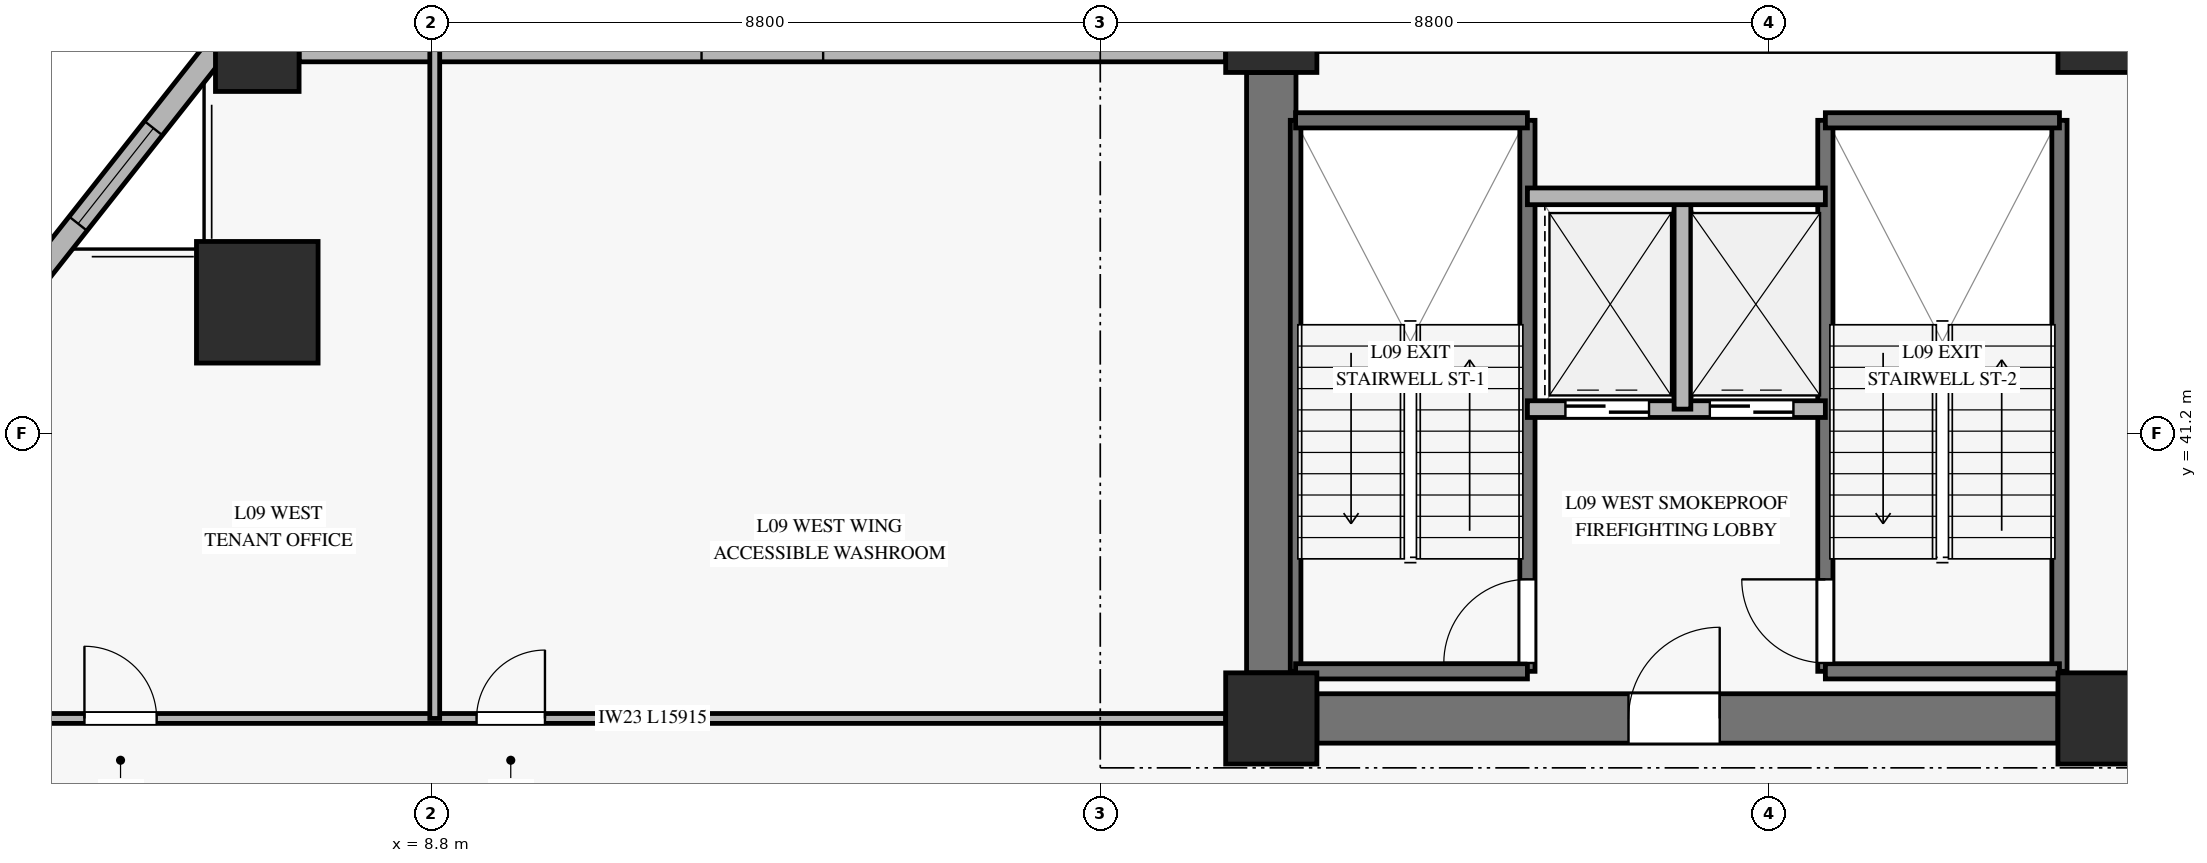
"""IFC4 building model, lengths in metres.
Left out: names, types, materials, properties, quantities, classifications, styles, units other than length and angle.
Written with IfcOpenShell. Run it as: python <this file> out.ifc"""

import sys

from ifc_helpers import new_model, si_unit, direction, frame, frame_2d, origin, origin_2d, place, context, subcontext, project, spatial, rectangle, hollow_rectangle, extrude, source, transform, mapped, element, fill, save


model = new_model("IFC4")
c1 = context("Model", 3, precision=1e-05, world=origin(), true_north=direction((0.0, 1.0)))
c2 = subcontext(c1, "Body", "Model", "MODEL_VIEW")
j1 = project(units=[si_unit("LENGTHUNIT", "METRE"), si_unit("PLANEANGLEUNIT", "RADIAN")], contexts=[c1])
p1 = place(None, origin())
s1 = spatial("IfcSite", under=j1, at=p1, CompositionType="ELEMENT")
p2 = place(p1, origin())
s2 = spatial("IfcBuilding", under=s1, at=p2, CompositionType="ELEMENT")
p3 = place(p2, frame((0.0, 0.0, 37.1)))
s3 = spatial("IfcBuildingStorey", under=s2, at=p3, CompositionType="ELEMENT", Elevation=37.1)
m1 = source(origin(), c2, "Body", "SweptSolid", [
    extrude(rectangle(XDim=1.2, YDim=1.2, at=origin_2d()), origin(), (0.0, 0.0, 1.0), 3.68),
])
for number, where, z_axis, x_axis in (
    (1, (19.85, 37.45, 0.0), (0.0, 0.0, 1.0), (1.0, 0.0, 0.0)),
    (2, (19.85, 46.55, 0.0), (0.0, 0.0, 1.0), (1.0, 0.0, 0.0)),
    (3, (30.8, 37.45, 0.0), (0.0, 0.0, 1.0), (1.0, 0.0, 0.0)),
    (4, (30.8, 46.55, 0.0), (0.0, 0.0, 1.0), (1.0, 0.0, 0.0)),
):
    element("IfcColumn", number, at=place(p3, frame(where, z_axis=z_axis, x_axis=x_axis)), inside=s3, PredefinedType="PILASTER", context=c2, shape_type="MappedRepresentation", body=[
        mapped(m1, transform((0.0, 0.0, 0.0), x_axis=(1.0, 0.0, 0.0), y_axis=(0.0, 1.0, 0.0), z_axis=(0.0, 0.0, 1.0), scale=1.0)),
    ])
p4 = place(p3, frame((20.45, 37.45, 0.0), z_axis=(0.0, 0.0, 1.0), x_axis=(1.0, 0.0, 0.0)))
e5 = element("IfcWall", 5, at=p4, inside=s3, PredefinedType="SHEAR", context=c2, shape_type="SweptSolid", body=[
    extrude(rectangle(XDim=9.75, YDim=0.65, at=frame_2d((4.875, 0.0))), origin(), (0.0, 0.0, 1.0), 3.68),
])
p5 = place(p4, frame((4.1, 0.0, 0.0)))
e6 = element("IfcOpeningElement", 6, at=p5, cuts=e5, PredefinedType="OPENING", context=c2, shape_type="SweptSolid", body=[
    extrude(rectangle(XDim=1.2, YDim=2.15, at=frame_2d((0.6, 1.075))), frame((0.0, 0.335, 0.0), z_axis=(0.0, -1.0, 0.0), x_axis=(1.0, 0.0, 0.0)), (0.0, 0.0, 1.0), 0.67),
])
p6 = place(p3, frame((19.85, 38.05, 0.0), z_axis=(0.0, 0.0, 1.0), x_axis=(0.0, 1.0, 0.0)))
e7 = element("IfcWall", 7, at=p6, inside=s3, PredefinedType="SHEAR", context=c2, shape_type="SweptSolid", body=[
    extrude(rectangle(XDim=7.9, YDim=0.65, at=frame_2d((3.95, 0.0))), origin(), (0.0, 0.0, 1.0), 3.68),
])
m2 = source(origin(), c2, "Body", "SweptSolid", [
    extrude(hollow_rectangle(XDim=1.6, YDim=1.6, WallThickness=0.075, at=origin_2d()), origin(), (0.0, 0.0, 1.0), 3.68),
])
p7 = place(p3, frame((6.509, 42.926, 0.0), z_axis=(0.0, 0.0, 1.0), x_axis=(1.0, 0.0, 0.0)))
e8 = element("IfcColumn", 8, at=p7, inside=s3, PredefinedType="COLUMN", context=c2, shape_type="MappedRepresentation", body=[
    mapped(m2, transform((0.0, 0.0, 0.0), x_axis=(1.0, 0.0, 0.0), y_axis=(0.0, 1.0, 0.0), z_axis=(0.0, 0.0, 1.0), scale=1.0)),
])
m3 = source(origin(), c2, "Body", "SweptSolid", [
    extrude(hollow_rectangle(XDim=1.1, YDim=1.1, WallThickness=0.05, at=origin_2d()), origin(), (0.0, 0.0, 1.0), 3.68),
])
p8 = place(p3, frame((6.509, 46.25, 0.0), z_axis=(0.0, 0.0, 1.0), x_axis=(1.0, 0.0, 0.0)))
e9 = element("IfcColumn", 9, at=p8, inside=s3, PredefinedType="COLUMN", context=c2, shape_type="MappedRepresentation", body=[
    mapped(m3, transform((0.0, 0.0, 0.0), x_axis=(1.0, 0.0, 0.0), y_axis=(0.0, 1.0, 0.0), z_axis=(0.0, 0.0, 1.0), scale=1.0)),
])
p9 = place(p3, frame((7.059, 46.25, 0.0), z_axis=(0.0, 0.0, 1.0), x_axis=(1.0, 0.0, 0.0)))
e10 = element("IfcWall", 10, at=p9, inside=s3, PredefinedType="SOLIDWALL", context=c2, shape_type="SweptSolid", body=[
    extrude(rectangle(XDim=12.191, YDim=0.32, at=frame_2d((6.095, 0.0))), origin(), (0.0, 0.0, 1.0), 3.16),
])
p10 = place(p9, frame((5.295, 0.0, 0.45)))
e11 = element("IfcOpeningElement", 11, at=p10, cuts=e10, PredefinedType="OPENING", context=c2, shape_type="SweptSolid", body=[
    extrude(rectangle(XDim=1.6, YDim=2.0, at=frame_2d((0.8, 1.0))), frame((0.0, 0.17, 0.0), z_axis=(0.0, -1.0, 0.0), x_axis=(1.0, 0.0, 0.0)), (0.0, 0.0, 1.0), 0.34),
])
p11 = place(p3, frame((5.959, 46.25, 0.0), z_axis=(0.0, 0.0, 1.0), x_axis=(-0.619619988795, -0.784901948963, 0.0)))
e12 = element("IfcWall", 12, at=p11, inside=s3, PredefinedType="SOLIDWALL", context=c2, shape_type="SweptSolid", body=[
    extrude(rectangle(XDim=4.235, YDim=0.3, at=frame_2d((2.117, 0.0))), origin(), (0.0, 0.0, 1.0), 3.16),
])
p12 = place(p11, frame((1.317, 0.0, 0.45)))
e13 = element("IfcOpeningElement", 13, at=p12, cuts=e12, PredefinedType="OPENING", context=c2, shape_type="SweptSolid", body=[
    extrude(rectangle(XDim=1.6, YDim=2.0, at=frame_2d((0.8, 1.0))), frame((0.0, 0.16, 0.0), z_axis=(0.0, -1.0, 0.0), x_axis=(1.0, 0.0, 0.0)), (0.0, 0.0, 1.0), 0.32),
])
p13 = place(p3, frame((20.17, 38.07, 0.0), z_axis=(0.0, 0.0, 1.0), x_axis=(0.0, 1.0, 0.0)))
e14 = element("IfcWall", 14, at=p13, inside=s3, PredefinedType="SOLIDWALL", context=c2, shape_type="SweptSolid", body=[
    extrude(rectangle(XDim=7.25, YDim=0.14, at=frame_2d((3.625, 0.0))), origin(), (0.0, 0.0, 1.0), 3.9),
])
p14 = place(p3, frame((23.22, 38.07, 0.0), z_axis=(0.0, 0.0, 1.0), x_axis=(0.0, 1.0, 0.0)))
e15 = element("IfcWall", 15, at=p14, inside=s3, PredefinedType="SOLIDWALL", context=c2, shape_type="SweptSolid", body=[
    extrude(rectangle(XDim=7.25, YDim=0.2, at=frame_2d((3.625, 0.0))), origin(), (0.0, 0.0, 1.0), 3.9),
])
p15 = place(p14, frame((0.11, 0.0, 0.0)))
e16 = element("IfcOpeningElement", 16, at=p15, cuts=e15, PredefinedType="OPENING", context=c2, shape_type="SweptSolid", body=[
    extrude(rectangle(XDim=1.1, YDim=2.15, at=frame_2d((0.55, 1.075))), frame((0.0, 0.11, 0.0), z_axis=(0.0, -1.0, 0.0), x_axis=(1.0, 0.0, 0.0)), (0.0, 0.0, 1.0), 0.22),
])
for number, where, z_axis, x_axis in (
    (17, (20.17, 45.32, 0.0), (0.0, 0.0, 1.0), (1.0, 0.0, 0.0)),
    (18, (20.17, 38.07, 0.0), (0.0, 0.0, 1.0), (1.0, 0.0, 0.0)),
):
    element("IfcWall", number, at=place(p3, frame(where, z_axis=z_axis, x_axis=x_axis)), inside=s3, PredefinedType="SOLIDWALL", context=c2, shape_type="SweptSolid", body=[
        extrude(rectangle(XDim=3.05, YDim=0.2, at=frame_2d((1.525, 0.0))), origin(), (0.0, 0.0, 1.0), 3.9),
    ])
p16 = place(p3, frame((27.14, 38.07, 0.0), z_axis=(0.0, 0.0, 1.0), x_axis=(0.0, 1.0, 0.0)))
e19 = element("IfcWall", 19, at=p16, inside=s3, PredefinedType="SOLIDWALL", context=c2, shape_type="SweptSolid", body=[
    extrude(rectangle(XDim=7.25, YDim=0.2, at=frame_2d((3.625, 0.0))), origin(), (0.0, 0.0, 1.0), 3.9),
])
p17 = place(p16, frame((0.11, 0.0, 0.0)))
e20 = element("IfcOpeningElement", 20, at=p17, cuts=e19, PredefinedType="OPENING", context=c2, shape_type="SweptSolid", body=[
    extrude(rectangle(XDim=1.1, YDim=2.15, at=frame_2d((0.55, 1.075))), frame((0.0, 0.11, 0.0), z_axis=(0.0, -1.0, 0.0), x_axis=(1.0, 0.0, 0.0)), (0.0, 0.0, 1.0), 0.22),
])
p18 = place(p3, frame((30.22, 38.07, 0.0), z_axis=(0.0, 0.0, 1.0), x_axis=(0.0, 1.0, 0.0)))
e21 = element("IfcWall", 21, at=p18, inside=s3, PredefinedType="SOLIDWALL", context=c2, shape_type="SweptSolid", body=[
    extrude(rectangle(XDim=7.25, YDim=0.2, at=frame_2d((3.625, 0.0))), origin(), (0.0, 0.0, 1.0), 3.9),
])
for number, where, z_axis, x_axis in (
    (22, (27.14, 45.32, 0.0), (0.0, 0.0, 1.0), (1.0, 0.0, 0.0)),
    (23, (27.14, 38.07, 0.0), (0.0, 0.0, 1.0), (1.0, 0.0, 0.0)),
):
    element("IfcWall", number, at=place(p3, frame(where, z_axis=z_axis, x_axis=x_axis)), inside=s3, PredefinedType="SOLIDWALL", context=c2, shape_type="SweptSolid", body=[
        extrude(rectangle(XDim=3.08, YDim=0.2, at=frame_2d((1.54, 0.0))), origin(), (0.0, 0.0, 1.0), 3.9),
    ])
p19 = place(p3, frame((23.22, 41.52, 0.0), z_axis=(0.0, 0.0, 1.0), x_axis=(1.0, 0.0, 0.0)))
e24 = element("IfcWall", 24, at=p19, inside=s3, PredefinedType="SOLIDWALL", context=c2, shape_type="SweptSolid", body=[
    extrude(rectangle(XDim=3.92, YDim=0.22, at=frame_2d((1.96, 0.0))), origin(), (0.0, 0.0, 1.0), 3.68),
])
p20 = place(p19, frame((0.5, 0.0, 0.0)))
e25 = element("IfcOpeningElement", 25, at=p20, cuts=e24, PredefinedType="OPENING", context=c2, shape_type="SweptSolid", body=[
    extrude(rectangle(XDim=1.1, YDim=2.2, at=frame_2d((0.55, 1.1))), frame((0.0, 0.12, 0.0), z_axis=(0.0, -1.0, 0.0), x_axis=(1.0, 0.0, 0.0)), (0.0, 0.0, 1.0), 0.24),
])
p21 = place(p19, frame((2.4, 0.0, 0.0)))
e26 = element("IfcOpeningElement", 26, at=p21, cuts=e24, PredefinedType="OPENING", context=c2, shape_type="SweptSolid", body=[
    extrude(rectangle(XDim=1.1, YDim=2.2, at=frame_2d((0.55, 1.1))), frame((0.0, 0.12, 0.0), z_axis=(0.0, -1.0, 0.0), x_axis=(1.0, 0.0, 0.0)), (0.0, 0.0, 1.0), 0.24),
])
p22 = place(p3, frame((25.26, 41.52, 0.0), z_axis=(0.0, 0.0, 1.0), x_axis=(0.0, 1.0, 0.0)))
e27 = element("IfcWall", 27, at=p22, inside=s3, PredefinedType="SOLIDWALL", context=c2, shape_type="SweptSolid", body=[
    extrude(rectangle(XDim=2.8, YDim=0.22, at=frame_2d((1.4, 0.0))), origin(), (0.0, 0.0, 1.0), 3.68),
])
p23 = place(p3, frame((23.22, 44.32, 0.0), z_axis=(0.0, 0.0, 1.0), x_axis=(1.0, 0.0, 0.0)))
e28 = element("IfcWall", 28, at=p23, inside=s3, PredefinedType="SOLIDWALL", context=c2, shape_type="SweptSolid", body=[
    extrude(rectangle(XDim=3.92, YDim=0.22, at=frame_2d((1.96, 0.0))), origin(), (0.0, 0.0, 1.0), 3.68),
])
p24 = place(p3, frame((3.335, 37.45, 0.0), z_axis=(0.0, 0.0, 1.0), x_axis=(1.0, 0.0, 0.0)))
e29 = element("IfcWall", 29, at=p24, inside=s3, PredefinedType="PARTITIONING", context=c2, shape_type="SweptSolid", body=[
    extrude(rectangle(XDim=15.915, YDim=0.13, at=frame_2d((7.958, 0.0))), origin(), (0.0, 0.0, 1.0), 3.165),
])
p25 = place(p24, frame((0.9, 0.0, 0.0)))
e30 = element("IfcOpeningElement", 30, at=p25, cuts=e29, PredefinedType="OPENING", context=c2, shape_type="SweptSolid", body=[
    extrude(rectangle(XDim=0.95, YDim=2.1, at=frame_2d((0.475, 1.05))), frame((0.0, 0.075, 0.0), z_axis=(0.0, -1.0, 0.0), x_axis=(1.0, 0.0, 0.0)), (0.0, 0.0, 1.0), 0.15),
])
p26 = place(p24, frame((6.059, 0.0, 0.0)))
e31 = element("IfcOpeningElement", 31, at=p26, cuts=e29, PredefinedType="OPENING", context=c2, shape_type="SweptSolid", body=[
    extrude(rectangle(XDim=0.9, YDim=2.1, at=frame_2d((0.45, 1.05))), frame((0.0, 0.075, 0.0), z_axis=(0.0, -1.0, 0.0), x_axis=(1.0, 0.0, 0.0)), (0.0, 0.0, 1.0), 0.15),
])
p27 = place(p3, frame((8.844, 37.45, 0.0), z_axis=(0.0, 0.0, 1.0), x_axis=(0.0, 1.0, 0.0)))
e32 = element("IfcWall", 32, at=p27, inside=s3, PredefinedType="PARTITIONING", context=c2, shape_type="SweptSolid", body=[
    extrude(rectangle(XDim=8.8, YDim=0.13, at=frame_2d((4.4, 0.0))), origin(), (0.0, 0.0, 1.0), 3.68),
])
m4 = source(origin(), c2, "Body", "SweptSolid", [
    extrude(rectangle(XDim=1.6, YDim=2.0, at=frame_2d((0.8, 1.0))), frame((0.0, 0.03, 0.0), z_axis=(0.0, -1.0, 0.0), x_axis=(1.0, 0.0, 0.0)), (0.0, 0.0, 1.0), 0.06),
])
p28 = place(p12, origin())
e33 = element("IfcWindow", 33, at=p28, inside=s3, PartitioningType="SINGLE_PANEL", PredefinedType="WINDOW", context=c2, shape_type="MappedRepresentation", body=[
    mapped(m4, transform((0.0, 0.0, 0.0), x_axis=(1.0, 0.0, 0.0), y_axis=(0.0, 1.0, 0.0), z_axis=(0.0, 0.0, 1.0), scale=1.0)),
])
fill(e13, e33)
m5 = source(origin(), c2, "Body", "SweptSolid", [
    extrude(rectangle(XDim=1.1, YDim=2.15, at=frame_2d((0.55, 1.075))), frame((0.0, 0.025, 0.0), z_axis=(0.0, -1.0, 0.0), x_axis=(1.0, 0.0, 0.0)), (0.0, 0.0, 1.0), 0.05),
])
p29 = place(p15, origin())
e34 = element("IfcDoor", 34, at=p29, inside=s3, OperationType="SINGLE_SWING_LEFT", PredefinedType="DOOR", context=c2, shape_type="MappedRepresentation", body=[
    mapped(m5, transform((0.0, 0.0, 0.0), x_axis=(1.0, 0.0, 0.0), y_axis=(0.0, 1.0, 0.0), z_axis=(0.0, 0.0, 1.0), scale=1.0)),
])
fill(e16, e34)
p30 = place(p17, origin())
e35 = element("IfcDoor", 35, at=p30, inside=s3, OperationType="SINGLE_SWING_RIGHT", PredefinedType="DOOR", context=c2, shape_type="MappedRepresentation", body=[
    mapped(m5, transform((0.0, 0.0, 0.0), x_axis=(1.0, 0.0, 0.0), y_axis=(0.0, 1.0, 0.0), z_axis=(0.0, 0.0, 1.0), scale=1.0)),
])
fill(e20, e35)
m6 = source(origin(), c2, "Body", "SweptSolid", [
    extrude(rectangle(XDim=1.1, YDim=2.2, at=frame_2d((0.55, 1.1))), frame((0.0, 0.025, 0.0), z_axis=(0.0, -1.0, 0.0), x_axis=(1.0, 0.0, 0.0)), (0.0, 0.0, 1.0), 0.05),
])
p31 = place(p20, origin())
e36 = element("IfcDoor", 36, at=p31, inside=s3, OperationType="SLIDING_TO_LEFT", PredefinedType="DOOR", context=c2, shape_type="MappedRepresentation", body=[
    mapped(m6, transform((0.0, 0.0, 0.0), x_axis=(1.0, 0.0, 0.0), y_axis=(0.0, 1.0, 0.0), z_axis=(0.0, 0.0, 1.0), scale=1.0)),
])
fill(e25, e36)
p32 = place(p21, origin())
e37 = element("IfcDoor", 37, at=p32, inside=s3, OperationType="SLIDING_TO_LEFT", PredefinedType="DOOR", context=c2, shape_type="MappedRepresentation", body=[
    mapped(m6, transform((0.0, 0.0, 0.0), x_axis=(1.0, 0.0, 0.0), y_axis=(0.0, 1.0, 0.0), z_axis=(0.0, 0.0, 1.0), scale=1.0)),
])
fill(e26, e37)
m7 = source(origin(), c2, "Body", "SweptSolid", [
    extrude(rectangle(XDim=1.2, YDim=2.15, at=frame_2d((0.6, 1.075))), frame((0.0, 0.025, 0.0), z_axis=(0.0, -1.0, 0.0), x_axis=(1.0, 0.0, 0.0)), (0.0, 0.0, 1.0), 0.05),
])
p33 = place(p5, origin())
e38 = element("IfcDoor", 38, at=p33, inside=s3, OperationType="SINGLE_SWING_RIGHT", PredefinedType="DOOR", context=c2, shape_type="MappedRepresentation", body=[
    mapped(m7, transform((0.0, 0.0, 0.0), x_axis=(1.0, 0.0, 0.0), y_axis=(0.0, 1.0, 0.0), z_axis=(0.0, 0.0, 1.0), scale=1.0)),
])
fill(e6, e38)
m8 = source(origin(), c2, "Body", "SweptSolid", [
    extrude(rectangle(XDim=0.95, YDim=2.1, at=frame_2d((0.475, 1.05))), frame((0.0, 0.025, 0.0), z_axis=(0.0, -1.0, 0.0), x_axis=(1.0, 0.0, 0.0)), (0.0, 0.0, 1.0), 0.05),
])
p34 = place(p25, origin())
e39 = element("IfcDoor", 39, at=p34, inside=s3, OperationType="SINGLE_SWING_LEFT", PredefinedType="DOOR", context=c2, shape_type="MappedRepresentation", body=[
    mapped(m8, transform((0.0, 0.0, 0.0), x_axis=(1.0, 0.0, 0.0), y_axis=(0.0, 1.0, 0.0), z_axis=(0.0, 0.0, 1.0), scale=1.0)),
])
fill(e30, e39)
m9 = source(origin(), c2, "Body", "SweptSolid", [
    extrude(rectangle(XDim=0.9, YDim=2.1, at=frame_2d((0.45, 1.05))), frame((0.0, 0.025, 0.0), z_axis=(0.0, -1.0, 0.0), x_axis=(1.0, 0.0, 0.0)), (0.0, 0.0, 1.0), 0.05),
])
p35 = place(p26, origin())
e40 = element("IfcDoor", 40, at=p35, inside=s3, OperationType="SINGLE_SWING_RIGHT", PredefinedType="DOOR", context=c2, shape_type="MappedRepresentation", body=[
    mapped(m9, transform((0.0, 0.0, 0.0), x_axis=(1.0, 0.0, 0.0), y_axis=(0.0, 1.0, 0.0), z_axis=(0.0, 0.0, 1.0), scale=1.0)),
])
fill(e31, e40)
save(model, sys.argv[1])
